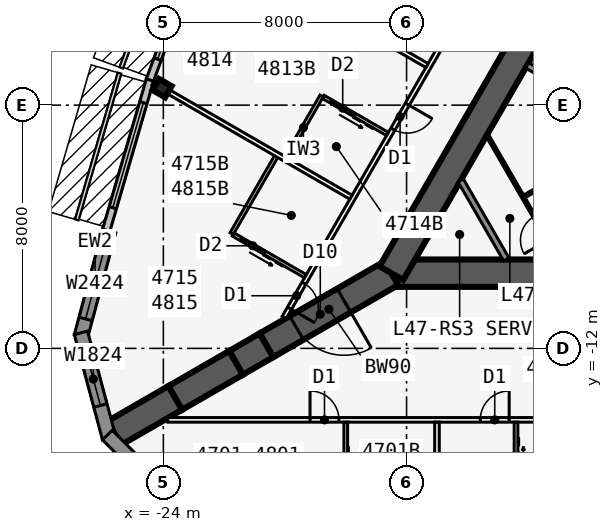
"""IFC4 building model, lengths in metres.
Left out: names, types, materials, properties, quantities, classifications, styles, units other than length and angle.
Written with IfcOpenShell. Run it as: python <this file> out.ifc"""

import sys

from ifc_helpers import new_model, si_unit, direction, frame, frame_2d, origin, origin_2d, place, context, subcontext, project, spatial, polyline, rectangle, i_section, outline, extrude, element, fill, save


model = new_model("IFC4")
c1 = context("Model", 3, precision=1e-05, world=origin(), true_north=direction((0.0, 1.0)))
c2 = subcontext(c1, "Body", "Model", "MODEL_VIEW")
j1 = project(units=[si_unit("LENGTHUNIT", "METRE"), si_unit("PLANEANGLEUNIT", "RADIAN")], contexts=[c1])
p1 = place(None, origin())
s1 = spatial("IfcSite", under=j1, at=p1, CompositionType="ELEMENT")
p2 = place(p1, origin())
s2 = spatial("IfcBuilding", under=s1, at=p2, CompositionType="ELEMENT")
p3 = place(p2, frame((0.0, 0.0, 175.9)))
s3 = spatial("IfcBuildingStorey", under=s2, at=p3, CompositionType="ELEMENT", Elevation=175.9)
p4 = place(p3, frame((-16.5, -9.526, 0.0), z_axis=(0.0, 0.0, 1.0), x_axis=(1.0, 0.0, 0.0)))
e1 = element("IfcWall", 1, at=p4, inside=s3, PredefinedType="SHEAR", context=c2, shape_type="SweptSolid", body=[
    extrude(rectangle(XDim=33.0, YDim=0.9, at=frame_2d((16.5, 0.0))), origin(), (0.0, 0.0, 1.0), 3.4),
])
p5 = place(p4, frame((14.05, 0.0, 0.0)))
e2 = element("IfcOpeningElement", 2, at=p5, cuts=e1, PredefinedType="OPENING", context=c2, shape_type="SweptSolid", body=[
    extrude(rectangle(XDim=1.8, YDim=2.13, at=frame_2d((0.9, 1.065))), frame((0.0, 0.46, 0.0), z_axis=(0.0, -1.0, 0.0), x_axis=(1.0, 0.0, 0.0)), (0.0, 0.0, 1.0), 0.92),
])
p6 = place(p3, frame((0.0, 19.052, 0.0), z_axis=(0.0, 0.0, 1.0), x_axis=(-0.499999749417, -0.866025548458, 0.0)))
e3 = element("IfcWall", 3, at=p6, inside=s3, PredefinedType="SHEAR", context=c2, shape_type="SweptSolid", body=[
    extrude(rectangle(XDim=33.0, YDim=0.9, at=frame_2d((16.5, 0.0))), origin(), (0.0, 0.0, 1.0), 3.4),
])
p7 = place(p6, frame((14.15, 0.0, 0.0)))
e4 = element("IfcOpeningElement", 4, at=p7, cuts=e3, PredefinedType="OPENING", context=c2, shape_type="SweptSolid", body=[
    extrude(rectangle(XDim=1.8, YDim=2.13, at=frame_2d((0.9, 1.065))), frame((0.0, 0.46, 0.0), z_axis=(0.0, -1.0, 0.0), x_axis=(1.0, 0.0, 0.0)), (0.0, 0.0, 1.0), 0.92),
])
p8 = place(p6, frame((12.6, 0.0, 0.0)))
e5 = element("IfcOpeningElement", 5, at=p8, cuts=e3, PredefinedType="OPENING", context=c2, shape_type="SweptSolid", body=[
    extrude(rectangle(XDim=1.0, YDim=2.13, at=frame_2d((0.5, 1.065))), frame((0.0, 0.46, 0.0), z_axis=(0.0, -1.0, 0.0), x_axis=(1.0, 0.0, 0.0)), (0.0, 0.0, 1.0), 0.92),
])
p9 = place(p3, frame((-9.329, -4.256, 0.0), z_axis=(0.0, 0.0, 1.0), x_axis=(-0.866022959057, 0.500004234368, 0.0)))
e6 = element("IfcWall", 6, at=p9, inside=s3, PredefinedType="SOLIDWALL", context=c2, shape_type="SweptSolid", body=[
    extrude(rectangle(XDim=3.125, YDim=0.2, at=frame_2d((1.562, 0.0))), origin(), (0.0, 0.0, 1.0), 3.235),
])
p10 = place(p3, frame((-16.5, -9.526, 0.0), z_axis=(0.0, 0.0, 1.0), x_axis=(-0.866031398331, -0.499989616998, 0.0)))
e7 = element("IfcWall", 7, at=p10, inside=s3, PredefinedType="SHEAR", context=c2, shape_type="SweptSolid", body=[
    extrude(rectangle(XDim=4.746, YDim=0.9, at=frame_2d((2.373, 0.0))), origin(), (0.0, 0.0, 1.0), 3.4),
])
p11 = place(p10, frame((1.8, 0.0, 0.0)))
e8 = element("IfcOpeningElement", 8, at=p11, cuts=e7, PredefinedType="OPENING", context=c2, shape_type="SweptSolid", body=[
    extrude(rectangle(XDim=1.8, YDim=2.13, at=frame_2d((0.9, 1.065))), frame((0.0, 0.46, 0.0), z_axis=(0.0, -1.0, 0.0), x_axis=(1.0, 0.0, 0.0)), (0.0, 0.0, 1.0), 0.92),
])
p12 = place(p3, frame((-20.61, -11.899, 0.0), z_axis=(0.0, 0.0, 1.0), x_axis=(-0.866009537788, -0.500027479704, 0.0)))
e9 = element("IfcWall", 9, at=p12, inside=s3, PredefinedType="SHEAR", context=c2, shape_type="SweptSolid", body=[
    extrude(rectangle(XDim=1.155, YDim=0.9, at=frame_2d((0.577, 0.0))), origin(), (0.0, 0.0, 1.0), 3.4),
])
for number, where, z_axis, x_axis in (
    (10, (-21.61, -12.477, 0.0), (0.0, 0.0, 1.0), (-0.866, -0.5, 0.0)),
    (11, (-23.61, -13.631, 0.0), (0.0, 0.0, 1.0), (-0.866, -0.5, 0.0)),
):
    element("IfcWall", number, at=place(p3, frame(where, z_axis=z_axis, x_axis=x_axis)), inside=s3, PredefinedType="SHEAR", context=c2, shape_type="SweptSolid", body=[
        extrude(rectangle(XDim=2.309, YDim=0.9, at=frame_2d((1.155, 0.0))), origin(), (0.0, 0.0, 1.0), 3.4),
    ])
p13 = place(p3, frame((-24.041, -3.44, 0.0), z_axis=(0.0, 0.0, 1.0), x_axis=(-0.5, -0.866025403784, 0.0)))
e12 = element("IfcColumn", 12, at=p13, inside=s3, PredefinedType="COLUMN", context=c2, shape_type="SweptSolid", body=[
    extrude(i_section(OverallWidth=0.424, OverallDepth=0.475, WebThickness=0.048, FlangeThickness=0.077, at=origin_2d()), origin(), (0.0, 0.0, 1.0), 3.4),
])
p14 = place(p3, frame((-22.701, 1.584, 0.0), z_axis=(0.0, 0.0, 1.0), x_axis=(-0.343225593282, -0.939252996863, 0.0)))
e13 = element("IfcWall", 13, at=p14, inside=s3, PredefinedType="STANDARD", context=c2, shape_type="SweptSolid", body=[
    extrude(rectangle(XDim=5.076, YDim=0.25, at=frame_2d((2.538, 0.0))), origin(), (0.0, 0.0, 1.0), 3.235),
])
p15 = place(p14, frame((0.738, 0.0, 0.45)))
e14 = element("IfcOpeningElement", 14, at=p15, cuts=e13, PredefinedType="OPENING", context=c2, shape_type="SweptSolid", body=[
    extrude(rectangle(XDim=3.6, YDim=2.4, at=frame_2d((1.8, 1.2))), frame((0.0, 0.135, 0.0), z_axis=(0.0, -1.0, 0.0), x_axis=(1.0, 0.0, 0.0)), (0.0, 0.0, 1.0), 0.27),
])
p16 = place(p3, frame((-24.441, -3.175, 0.0), z_axis=(0.0, 0.0, 1.0), x_axis=(-0.279528287117, -0.960137457191, 0.0)))
e15 = element("IfcWall", 15, at=p16, inside=s3, PredefinedType="STANDARD", context=c2, shape_type="SweptSolid", body=[
    extrude(rectangle(XDim=5.148, YDim=0.25, at=frame_2d((2.574, 0.0))), origin(), (0.0, 0.0, 1.0), 3.235),
])
p17 = place(p16, frame((0.774, 0.0, 0.45)))
e16 = element("IfcOpeningElement", 16, at=p17, cuts=e15, PredefinedType="OPENING", context=c2, shape_type="SweptSolid", body=[
    extrude(rectangle(XDim=3.6, YDim=2.4, at=frame_2d((1.8, 1.2))), frame((0.0, 0.135, 0.0), z_axis=(0.0, -1.0, 0.0), x_axis=(1.0, 0.0, 0.0)), (0.0, 0.0, 1.0), 0.27),
])
p18 = place(p3, frame((-25.783, -8.141, 0.0), z_axis=(0.0, 0.0, 1.0), x_axis=(-0.258823421857, -0.965924653531, 0.0)))
e17 = element("IfcWall", 17, at=p18, inside=s3, PredefinedType="SOLIDWALL", context=c2, shape_type="SweptSolid", body=[
    extrude(rectangle(XDim=3.586, YDim=0.45, at=frame_2d((1.793, 0.0))), origin(), (0.0, 0.0, 1.0), 3.235),
])
p19 = place(p18, frame((0.593, 0.0, 0.45)))
e18 = element("IfcOpeningElement", 18, at=p19, cuts=e17, PredefinedType="OPENING", context=c2, shape_type="SweptSolid", body=[
    extrude(rectangle(XDim=2.4, YDim=2.4, at=frame_2d((1.2, 1.2))), frame((0.0, 0.235, 0.0), z_axis=(0.0, -1.0, 0.0), x_axis=(1.0, 0.0, 0.0)), (0.0, 0.0, 1.0), 0.47),
])
p20 = place(p3, frame((-26.711, -11.489, 0.0), z_axis=(0.0, 0.0, 1.0), x_axis=(0.258823421857, -0.965924653531, 0.0)))
e19 = element("IfcWall", 19, at=p20, inside=s3, PredefinedType="SOLIDWALL", context=c2, shape_type="SweptSolid", body=[
    extrude(outline(polyline([(3.586, 0.225), (3.527, 0.225), (3.035, 0.093), (3.0, 0.225), (0.0, 0.225), (0.0, -0.225), (3.586, -0.225), (3.586, 0.225)])), origin(), (0.0, 0.0, 1.0), 3.235),
])
p21 = place(p20, frame((0.675, 0.0, 0.45)))
e20 = element("IfcOpeningElement", 20, at=p21, cuts=e19, PredefinedType="OPENING", context=c2, shape_type="SweptSolid", body=[
    extrude(rectangle(XDim=1.8, YDim=2.4, at=frame_2d((0.9, 1.2))), frame((0.0, 0.235, 0.0), z_axis=(0.0, -1.0, 0.0), x_axis=(1.0, 0.0, 0.0)), (0.0, 0.0, 1.0), 0.47),
])
p22 = place(p3, frame((-25.841, -14.852, 0.0), z_axis=(0.0, 0.0, 1.0), x_axis=(0.707106781187, -0.707106781187, 0.0)))
e21 = element("IfcWall", 21, at=p22, inside=s3, PredefinedType="SOLIDWALL", context=c2, shape_type="SweptSolid", body=[
    extrude(outline(polyline([(3.586, 0.225), (0.586, 0.225), (0.551, 0.093), (0.059, 0.225), (0.0, 0.225), (0.0, -0.225), (3.586, -0.225), (3.586, 0.225)])), origin(), (0.0, 0.0, 1.0), 3.235),
])
p23 = place(p22, frame((1.111, 0.0, 0.45)))
e22 = element("IfcOpeningElement", 22, at=p23, cuts=e21, PredefinedType="OPENING", context=c2, shape_type="SweptSolid", body=[
    extrude(rectangle(XDim=1.8, YDim=2.4, at=frame_2d((0.9, 1.2))), frame((0.0, 0.235, 0.0), z_axis=(0.0, -1.0, 0.0), x_axis=(1.0, 0.0, 0.0)), (0.0, 0.0, 1.0), 0.47),
])
p24 = place(p3, frame((-23.857, -14.351, 0.0), z_axis=(0.0, 0.0, 1.0), x_axis=(1.0, 0.0, 0.0)))
e23 = element("IfcWall", 23, at=p24, inside=s3, PredefinedType="PARTITIONING", context=c2, shape_type="SweptSolid", body=[
    extrude(rectangle(XDim=47.714, YDim=0.15, at=frame_2d((23.857, 0.0))), origin(), (0.0, 0.0, 1.0), 3.235),
])
p25 = place(p24, frame((4.682, 0.0, 0.0)))
e24 = element("IfcOpeningElement", 24, at=p25, cuts=e23, PredefinedType="OPENING", context=c2, shape_type="SweptSolid", body=[
    extrude(rectangle(XDim=0.95, YDim=2.13, at=frame_2d((0.475, 1.065))), frame((0.0, 0.085, 0.0), z_axis=(0.0, -1.0, 0.0), x_axis=(1.0, 0.0, 0.0)), (0.0, 0.0, 1.0), 0.17),
])
p26 = place(p24, frame((10.282, 0.0, 0.0)))
e25 = element("IfcOpeningElement", 25, at=p26, cuts=e23, PredefinedType="OPENING", context=c2, shape_type="SweptSolid", body=[
    extrude(rectangle(XDim=0.95, YDim=2.13, at=frame_2d((0.475, 1.065))), frame((0.0, 0.085, 0.0), z_axis=(0.0, -1.0, 0.0), x_axis=(1.0, 0.0, 0.0)), (0.0, 0.0, 1.0), 0.17),
])
p27 = place(p24, frame((17.082, 0.0, 0.0)))
e26 = element("IfcOpeningElement", 26, at=p27, cuts=e23, PredefinedType="OPENING", context=c2, shape_type="SweptSolid", body=[
    extrude(rectangle(XDim=0.95, YDim=2.13, at=frame_2d((0.475, 1.065))), frame((0.0, 0.085, 0.0), z_axis=(0.0, -1.0, 0.0), x_axis=(1.0, 0.0, 0.0)), (0.0, 0.0, 1.0), 0.17),
])
p28 = place(p24, frame((25.857, 0.0, 0.0)))
e27 = element("IfcOpeningElement", 27, at=p28, cuts=e23, PredefinedType="OPENING", context=c2, shape_type="SweptSolid", body=[
    extrude(rectangle(XDim=1.0, YDim=2.13, at=frame_2d((0.5, 1.065))), frame((0.0, 0.085, 0.0), z_axis=(0.0, -1.0, 0.0), x_axis=(1.0, 0.0, 0.0)), (0.0, 0.0, 1.0), 0.17),
])
p29 = place(p24, frame((34.682, 0.0, 0.0)))
e28 = element("IfcOpeningElement", 28, at=p29, cuts=e23, PredefinedType="OPENING", context=c2, shape_type="SweptSolid", body=[
    extrude(rectangle(XDim=0.95, YDim=2.13, at=frame_2d((0.475, 1.065))), frame((0.0, 0.085, 0.0), z_axis=(0.0, -1.0, 0.0), x_axis=(1.0, 0.0, 0.0)), (0.0, 0.0, 1.0), 0.17),
])
p30 = place(p24, frame((42.082, 0.0, 0.0)))
e29 = element("IfcOpeningElement", 29, at=p30, cuts=e23, PredefinedType="OPENING", context=c2, shape_type="SweptSolid", body=[
    extrude(rectangle(XDim=0.95, YDim=2.13, at=frame_2d((0.475, 1.065))), frame((0.0, 0.085, 0.0), z_axis=(0.0, -1.0, 0.0), x_axis=(1.0, 0.0, 0.0)), (0.0, 0.0, 1.0), 0.17),
])
p31 = place(p3, frame((-15.0, -14.426, 0.0), z_axis=(0.0, 0.0, 1.0), x_axis=(0.0, -1.0, 0.0)))
e30 = element("IfcWall", 30, at=p31, inside=s3, PredefinedType="PARTITIONING", context=c2, shape_type="SweptSolid", body=[
    extrude(rectangle(XDim=5.017, YDim=0.15, at=frame_2d((2.508, 0.0))), origin(), (0.0, 0.0, 1.0), 2.389),
])
p32 = place(p3, frame((-18.0, -14.426, 0.0), z_axis=(0.0, 0.0, 1.0), x_axis=(0.0, -1.0, 0.0)))
e31 = element("IfcWall", 31, at=p32, inside=s3, PredefinedType="PLUMBINGWALL", context=c2, shape_type="SweptSolid", body=[
    extrude(rectangle(XDim=2.74, YDim=0.12, at=frame_2d((1.37, 0.0))), origin(), (0.0, 0.0, 1.0), 3.235),
])
p33 = place(p32, frame((1.55, 0.0, 0.0)))
e32 = element("IfcOpeningElement", 32, at=p33, cuts=e31, PredefinedType="OPENING", context=c2, shape_type="SweptSolid", body=[
    extrude(rectangle(XDim=0.9, YDim=2.13, at=frame_2d((0.45, 1.065))), frame((0.0, 0.07, 0.0), z_axis=(0.0, -1.0, 0.0), x_axis=(1.0, 0.0, 0.0)), (0.0, 0.0, 1.0), 0.14),
])
p34 = place(p3, frame((-12.4, -14.426, 0.0), z_axis=(0.0, 0.0, 1.0), x_axis=(0.0, -1.0, 0.0)))
e33 = element("IfcWall", 33, at=p34, inside=s3, PredefinedType="PLUMBINGWALL", context=c2, shape_type="SweptSolid", body=[
    extrude(rectangle(XDim=2.44, YDim=0.12, at=frame_2d((1.22, 0.0))), origin(), (0.0, 0.0, 1.0), 3.235),
])
p35 = place(p34, frame((1.25, 0.0, 0.0)))
e34 = element("IfcOpeningElement", 34, at=p35, cuts=e33, PredefinedType="OPENING", context=c2, shape_type="SweptSolid", body=[
    extrude(rectangle(XDim=0.9, YDim=2.13, at=frame_2d((0.45, 1.065))), frame((0.0, 0.07, 0.0), z_axis=(0.0, -1.0, 0.0), x_axis=(1.0, 0.0, 0.0)), (0.0, 0.0, 1.0), 0.14),
])
p36 = place(p3, frame((-0.5, 22.836, 0.0), z_axis=(0.0, 0.0, 1.0), x_axis=(-0.500001677587, -0.866024435227, 0.0)))
e35 = element("IfcWall", 35, at=p36, inside=s3, PredefinedType="PARTITIONING", context=c2, shape_type="SweptSolid", body=[
    extrude(rectangle(XDim=39.054, YDim=0.15, at=frame_2d((19.527, 0.0))), origin(), (0.0, 0.0, 1.0), 3.235),
])
p37 = place(p36, frame((0.352, 0.0, 0.0)))
e36 = element("IfcOpeningElement", 36, at=p37, cuts=e35, PredefinedType="OPENING", context=c2, shape_type="SweptSolid", body=[
    extrude(rectangle(XDim=0.95, YDim=2.13, at=frame_2d((0.475, 1.065))), frame((0.0, 0.085, 0.0), z_axis=(0.0, -1.0, 0.0), x_axis=(1.0, 0.0, 0.0)), (0.0, 0.0, 1.0), 0.17),
])
p38 = place(p36, frame((6.552, 0.0, 0.0)))
e37 = element("IfcOpeningElement", 37, at=p38, cuts=e35, PredefinedType="OPENING", context=c2, shape_type="SweptSolid", body=[
    extrude(rectangle(XDim=0.95, YDim=2.13, at=frame_2d((0.475, 1.065))), frame((0.0, 0.085, 0.0), z_axis=(0.0, -1.0, 0.0), x_axis=(1.0, 0.0, 0.0)), (0.0, 0.0, 1.0), 0.17),
])
p39 = place(p36, frame((15.952, 0.0, 0.0)))
e38 = element("IfcOpeningElement", 38, at=p39, cuts=e35, PredefinedType="OPENING", context=c2, shape_type="SweptSolid", body=[
    extrude(rectangle(XDim=0.95, YDim=2.13, at=frame_2d((0.475, 1.065))), frame((0.0, 0.085, 0.0), z_axis=(0.0, -1.0, 0.0), x_axis=(1.0, 0.0, 0.0)), (0.0, 0.0, 1.0), 0.17),
])
p40 = place(p36, frame((21.552, 0.0, 0.0)))
e39 = element("IfcOpeningElement", 39, at=p40, cuts=e35, PredefinedType="OPENING", context=c2, shape_type="SweptSolid", body=[
    extrude(rectangle(XDim=0.95, YDim=2.13, at=frame_2d((0.475, 1.065))), frame((0.0, 0.085, 0.0), z_axis=(0.0, -1.0, 0.0), x_axis=(1.0, 0.0, 0.0)), (0.0, 0.0, 1.0), 0.17),
])
p41 = place(p36, frame((30.952, 0.0, 0.0)))
e40 = element("IfcOpeningElement", 40, at=p41, cuts=e35, PredefinedType="OPENING", context=c2, shape_type="SweptSolid", body=[
    extrude(rectangle(XDim=0.95, YDim=2.13, at=frame_2d((0.475, 1.065))), frame((0.0, 0.085, 0.0), z_axis=(0.0, -1.0, 0.0), x_axis=(1.0, 0.0, 0.0)), (0.0, 0.0, 1.0), 0.17),
])
p42 = place(p36, frame((37.752, 0.0, 0.0)))
e41 = element("IfcOpeningElement", 41, at=p42, cuts=e35, PredefinedType="OPENING", context=c2, shape_type="SweptSolid", body=[
    extrude(rectangle(XDim=0.95, YDim=2.13, at=frame_2d((0.475, 1.065))), frame((0.0, 0.085, 0.0), z_axis=(0.0, -1.0, 0.0), x_axis=(1.0, 0.0, 0.0)), (0.0, 0.0, 1.0), 0.17),
])
p43 = place(p3, frame((-15.329, -2.697, 0.0), z_axis=(0.0, 0.0, 1.0), x_axis=(-0.866024316602, 0.50000188305, 0.0)))
e42 = element("IfcWall", 42, at=p43, inside=s3, PredefinedType="PARTITIONING", context=c2, shape_type="SweptSolid", body=[
    extrude(rectangle(XDim=8.395, YDim=0.15, at=frame_2d((4.198, 0.0))), origin(), (0.0, 0.0, 1.0), 2.389),
])
p44 = place(p3, frame((-17.829, -7.027, 0.0), z_axis=(0.0, 0.0, 1.0), x_axis=(-0.866029804378, 0.499992377871, 0.0)))
e43 = element("IfcWall", 43, at=p44, inside=s3, PredefinedType="PARTITIONING", context=c2, shape_type="SweptSolid", body=[
    extrude(rectangle(XDim=7.516, YDim=0.15, at=frame_2d((3.758, 0.0))), origin(), (0.0, 0.0, 1.0), 2.389),
])
p45 = place(p3, frame((-18.793, -3.699, 0.0), z_axis=(0.0, 0.0, 1.0), x_axis=(-0.500001309137, -0.866024647952, 0.0)))
e44 = element("IfcWall", 44, at=p45, inside=s3, PredefinedType="PLUMBINGWALL", context=c2, shape_type="SweptSolid", body=[
    extrude(rectangle(XDim=2.4, YDim=0.12, at=frame_2d((1.2, 0.0))), origin(), (0.0, 0.0, 1.0), 3.235),
])
p46 = place(p3, frame((-16.628, -4.949, 0.0), z_axis=(0.0, 0.0, 1.0), x_axis=(-0.866048967903, 0.499959183527, 0.0)))
e45 = element("IfcWall", 45, at=p46, inside=s3, PredefinedType="PLUMBINGWALL", context=c2, shape_type="SweptSolid", body=[
    extrude(rectangle(XDim=2.44, YDim=0.12, at=frame_2d((1.22, 0.0))), origin(), (0.0, 0.0, 1.0), 3.235),
])
p47 = place(p46, frame((1.25, 0.0, 0.0)))
e46 = element("IfcOpeningElement", 46, at=p47, cuts=e45, PredefinedType="OPENING", context=c2, shape_type="SweptSolid", body=[
    extrude(rectangle(XDim=0.9, YDim=2.13, at=frame_2d((0.45, 1.065))), frame((0.0, 0.07, 0.0), z_axis=(0.0, -1.0, 0.0), x_axis=(1.0, 0.0, 0.0)), (0.0, 0.0, 1.0), 0.14),
])
p48 = place(p3, frame((-20.253, -5.627, 0.0), z_axis=(0.0, 0.0, 1.0), x_axis=(-0.499990139034, -0.866031096941, 0.0)))
e47 = element("IfcWall", 47, at=p48, inside=s3, PredefinedType="PLUMBINGWALL", context=c2, shape_type="SweptSolid", body=[
    extrude(rectangle(XDim=3.0, YDim=0.12, at=frame_2d((1.5, 0.0))), origin(), (0.0, 0.0, 1.0), 3.235),
])
p49 = place(p3, frame((-19.329, -9.625, 0.0), z_axis=(0.0, 0.0, 1.0), x_axis=(-0.866035715982, 0.499982138324, 0.0)))
e48 = element("IfcWall", 48, at=p49, inside=s3, PredefinedType="PLUMBINGWALL", context=c2, shape_type="SweptSolid", body=[
    extrude(rectangle(XDim=2.74, YDim=0.12, at=frame_2d((1.37, 0.0))), origin(), (0.0, 0.0, 1.0), 3.235),
])
p50 = place(p49, frame((1.55, 0.0, 0.0)))
e49 = element("IfcOpeningElement", 49, at=p50, cuts=e48, PredefinedType="OPENING", context=c2, shape_type="SweptSolid", body=[
    extrude(rectangle(XDim=0.9, YDim=2.13, at=frame_2d((0.45, 1.065))), frame((0.0, 0.07, 0.0), z_axis=(0.0, -1.0, 0.0), x_axis=(1.0, 0.0, 0.0)), (0.0, 0.0, 1.0), 0.14),
])
p51 = place(p3, frame((-12.719, -9.076, 0.0), z_axis=(0.0, 0.0, 1.0), x_axis=(-0.499952404951, 0.866052881055, 0.0)))
e50 = element("IfcWall", 50, at=p51, inside=s3, PredefinedType="SOLIDWALL", context=c2, shape_type="SweptSolid", body=[
    extrude(rectangle(XDim=3.002, YDim=0.2, at=frame_2d((1.501, 0.0))), origin(), (0.0, 0.0, 1.0), 3.235),
])
p52 = place(p3, frame((-10.986, -9.076, 0.0), z_axis=(0.0, 0.0, 1.0), x_axis=(-0.499999210213, 0.866025859768, 0.0)))
e51 = element("IfcWall", 51, at=p52, inside=s3, PredefinedType="PARTITIONING", context=c2, shape_type="SweptSolid", body=[
    extrude(rectangle(XDim=4.734, YDim=0.1, at=frame_2d((2.367, 0.0))), origin(), (0.0, 0.0, 1.0), 3.235),
])
p53 = place(p52, frame((0.734, 0.0, 0.0)))
e52 = element("IfcOpeningElement", 52, at=p53, cuts=e51, PredefinedType="OPENING", context=c2, shape_type="SweptSolid", body=[
    extrude(rectangle(XDim=0.9, YDim=2.13, at=frame_2d((0.45, 1.065))), frame((0.0, 0.06, 0.0), z_axis=(0.0, -1.0, 0.0), x_axis=(1.0, 0.0, 0.0)), (0.0, 0.0, 1.0), 0.12),
])
p54 = place(p3, frame((-12.17, -7.026, 0.0), z_axis=(0.0, 0.0, 1.0), x_axis=(0.866015833478, 0.50001657589, 0.0)))
e53 = element("IfcWall", 53, at=p54, inside=s3, PredefinedType="PARTITIONING", context=c2, shape_type="SweptSolid", body=[
    extrude(rectangle(XDim=2.275, YDim=0.1, at=frame_2d((1.138, 0.0))), origin(), (0.0, 0.0, 1.0), 3.235),
])
p55 = place(p54, frame((0.915, 0.0, 0.0)))
e54 = element("IfcOpeningElement", 54, at=p55, cuts=e53, PredefinedType="OPENING", context=c2, shape_type="SweptSolid", body=[
    extrude(rectangle(XDim=0.9, YDim=2.13, at=frame_2d((0.45, 1.065))), frame((0.0, 0.06, 0.0), z_axis=(0.0, -1.0, 0.0), x_axis=(1.0, 0.0, 0.0)), (0.0, 0.0, 1.0), 0.12),
])
p56 = place(p15, origin())
e55 = element("IfcWindow", 55, at=p56, inside=s3, PartitioningType="SINGLE_PANEL", PredefinedType="WINDOW", context=c2, shape_type="SweptSolid", body=[
    extrude(rectangle(XDim=3.6, YDim=2.4, at=frame_2d((1.8, 1.2))), frame((0.0, 0.03, 0.0), z_axis=(0.0, -1.0, 0.0), x_axis=(1.0, 0.0, 0.0)), (0.0, 0.0, 1.0), 0.06),
])
fill(e14, e55)
p57 = place(p17, origin())
e56 = element("IfcWindow", 56, at=p57, inside=s3, PartitioningType="SINGLE_PANEL", PredefinedType="WINDOW", context=c2, shape_type="SweptSolid", body=[
    extrude(rectangle(XDim=3.6, YDim=2.4, at=frame_2d((1.8, 1.2))), frame((0.0, 0.03, 0.0), z_axis=(0.0, -1.0, 0.0), x_axis=(1.0, 0.0, 0.0)), (0.0, 0.0, 1.0), 0.06),
])
fill(e16, e56)
p58 = place(p19, origin())
e57 = element("IfcWindow", 57, at=p58, inside=s3, PartitioningType="SINGLE_PANEL", PredefinedType="WINDOW", context=c2, shape_type="SweptSolid", body=[
    extrude(rectangle(XDim=2.4, YDim=2.4, at=frame_2d((1.2, 1.2))), frame((0.0, 0.03, 0.0), z_axis=(0.0, -1.0, 0.0), x_axis=(1.0, 0.0, 0.0)), (0.0, 0.0, 1.0), 0.06),
])
fill(e18, e57)
p59 = place(p21, origin())
e58 = element("IfcWindow", 58, at=p59, inside=s3, PartitioningType="SINGLE_PANEL", PredefinedType="WINDOW", context=c2, shape_type="SweptSolid", body=[
    extrude(rectangle(XDim=1.8, YDim=2.4, at=frame_2d((0.9, 1.2))), frame((0.0, 0.03, 0.0), z_axis=(0.0, -1.0, 0.0), x_axis=(1.0, 0.0, 0.0)), (0.0, 0.0, 1.0), 0.06),
])
fill(e20, e58)
p60 = place(p25, origin())
e59 = element("IfcDoor", 59, at=p60, inside=s3, OperationType="SINGLE_SWING_LEFT", PredefinedType="DOOR", context=c2, shape_type="SweptSolid", body=[
    extrude(rectangle(XDim=0.95, YDim=2.13, at=frame_2d((0.475, 1.065))), frame((0.0, 0.025, 0.0), z_axis=(0.0, -1.0, 0.0), x_axis=(1.0, 0.0, 0.0)), (0.0, 0.0, 1.0), 0.05),
])
fill(e24, e59)
p61 = place(p26, origin())
e60 = element("IfcDoor", 60, at=p61, inside=s3, OperationType="SINGLE_SWING_RIGHT", PredefinedType="DOOR", context=c2, shape_type="SweptSolid", body=[
    extrude(rectangle(XDim=0.95, YDim=2.13, at=frame_2d((0.475, 1.065))), frame((0.0, 0.025, 0.0), z_axis=(0.0, -1.0, 0.0), x_axis=(1.0, 0.0, 0.0)), (0.0, 0.0, 1.0), 0.05),
])
fill(e25, e60)
p62 = place(p47, origin())
e61 = element("IfcDoor", 61, at=p62, inside=s3, OperationType="SLIDING_TO_LEFT", PredefinedType="DOOR", context=c2, shape_type="SweptSolid", body=[
    extrude(rectangle(XDim=0.9, YDim=2.13, at=frame_2d((0.45, 1.065))), frame((0.0, 0.025, 0.0), z_axis=(0.0, -1.0, 0.0), x_axis=(1.0, 0.0, 0.0)), (0.0, 0.0, 1.0), 0.05),
])
fill(e46, e61)
p63 = place(p41, origin())
e62 = element("IfcDoor", 62, at=p63, inside=s3, OperationType="SINGLE_SWING_LEFT", PredefinedType="DOOR", context=c2, shape_type="SweptSolid", body=[
    extrude(rectangle(XDim=0.95, YDim=2.13, at=frame_2d((0.475, 1.065))), frame((0.0, 0.025, 0.0), z_axis=(0.0, -1.0, 0.0), x_axis=(1.0, 0.0, 0.0)), (0.0, 0.0, 1.0), 0.05),
])
fill(e40, e62)
p64 = place(p50, origin())
e63 = element("IfcDoor", 63, at=p64, inside=s3, OperationType="SLIDING_TO_LEFT", PredefinedType="DOOR", context=c2, shape_type="SweptSolid", body=[
    extrude(rectangle(XDim=0.9, YDim=2.13, at=frame_2d((0.45, 1.065))), frame((0.0, 0.025, 0.0), z_axis=(0.0, -1.0, 0.0), x_axis=(1.0, 0.0, 0.0)), (0.0, 0.0, 1.0), 0.05),
])
fill(e49, e63)
p65 = place(p42, origin())
e64 = element("IfcDoor", 64, at=p65, inside=s3, OperationType="SINGLE_SWING_RIGHT", PredefinedType="DOOR", context=c2, shape_type="SweptSolid", body=[
    extrude(rectangle(XDim=0.95, YDim=2.13, at=frame_2d((0.475, 1.065))), frame((0.0, 0.025, 0.0), z_axis=(0.0, -1.0, 0.0), x_axis=(1.0, 0.0, 0.0)), (0.0, 0.0, 1.0), 0.05),
])
fill(e41, e64)
p66 = place(p11, origin())
e65 = element("IfcDoor", 65, at=p66, inside=s3, OperationType="DOUBLE_DOOR_DOUBLE_SWING", PredefinedType="DOOR", context=c2, shape_type="SweptSolid", body=[
    extrude(rectangle(XDim=1.8, YDim=2.13, at=frame_2d((0.9, 1.065))), frame((0.0, 0.025, 0.0), z_axis=(0.0, -1.0, 0.0), x_axis=(1.0, 0.0, 0.0)), (0.0, 0.0, 1.0), 0.05),
])
fill(e8, e65)
save(model, sys.argv[1])
